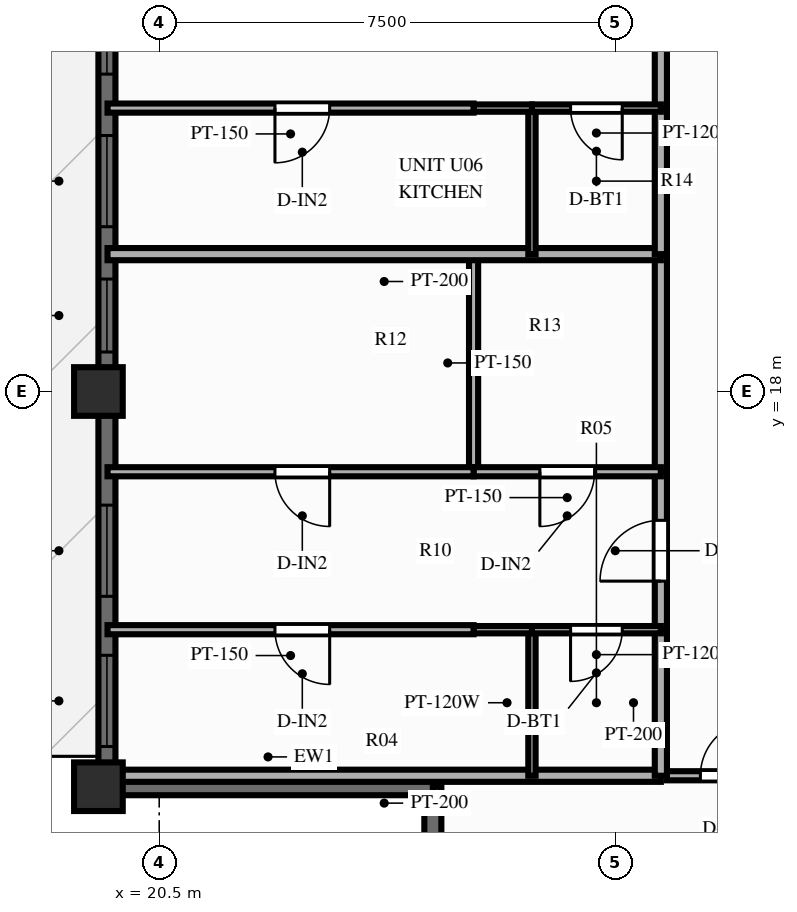
"""IFC4 building model, lengths in metres.
Left out: names, types, materials, properties, quantities, classifications, styles, units other than length and angle.
Written with IfcOpenShell. Run it as: python <this file> out.ifc"""

import sys

from ifc_helpers import new_model, si_unit, direction, frame, frame_2d, origin, origin_2d, place, context, subcontext, project, spatial, rectangle, extrude, source, transform, mapped, element, fill, save


model = new_model("IFC4")
c1 = context("Model", 3, precision=1e-05, world=origin(), true_north=direction((0.0, 1.0)))
c2 = subcontext(c1, "Body", "Model", "MODEL_VIEW")
j1 = project(units=[si_unit("LENGTHUNIT", "METRE"), si_unit("PLANEANGLEUNIT", "RADIAN")], contexts=[c1])
p1 = place(None, origin())
s1 = spatial("IfcSite", under=j1, at=p1, CompositionType="ELEMENT")
p2 = place(p1, origin())
s2 = spatial("IfcBuilding", under=s1, at=p2, CompositionType="ELEMENT")
p3 = place(p2, frame((0.0, 0.0, 202.6)))
s3 = spatial("IfcBuildingStorey", under=s2, at=p3, CompositionType="ELEMENT", Elevation=202.6)
m1 = source(origin(), c2, "Body", "SweptSolid", [
    extrude(rectangle(XDim=0.8, YDim=0.8, at=origin_2d()), origin(), (0.0, 0.0, 1.0), 3.9),
])
for number, where, z_axis, x_axis in (
    (1, (19.5, 18.0, 0.0), (0.0, 0.0, 1.0), (1.0, 0.0, 0.0)),
    (2, (19.5, 11.5, 0.0), (0.0, 0.0, 1.0), (1.0, 0.0, 0.0)),
):
    element("IfcColumn", number, at=place(p3, frame(where, z_axis=z_axis, x_axis=x_axis)), inside=s3, PredefinedType="COLUMN", context=c2, shape_type="MappedRepresentation", body=[
        mapped(m1, transform((0.0, 0.0, 0.0), scale=1.0)),
    ])
p4 = place(p3, frame((19.64, 11.5, 0.0), z_axis=(0.0, 0.0, 1.0), x_axis=(0.0, 1.0, 0.0)))
e3 = element("IfcWall", 3, at=p4, inside=s3, PredefinedType="SOLIDWALL", context=c2, shape_type="SweptSolid", body=[
    extrude(rectangle(XDim=31.0, YDim=0.28, at=frame_2d((15.5, 0.0))), origin(), (0.0, 0.0, 1.0), 2.79),
])
p5 = place(p4, frame((0.661, 0.0, 0.85)))
e4 = element("IfcOpeningElement", 4, at=p5, cuts=e3, PredefinedType="OPENING", context=c2, shape_type="SweptSolid", body=[
    extrude(rectangle(XDim=1.5, YDim=1.65, at=frame_2d((0.75, 0.825))), frame((0.0, 0.152, 0.0), z_axis=(0.0, -1.0, 0.0), x_axis=(1.0, 0.0, 0.0)), (0.0, 0.0, 1.0), 0.304),
])
p6 = place(p4, frame((3.131, 0.0, 0.85)))
e5 = element("IfcOpeningElement", 5, at=p6, cuts=e3, PredefinedType="OPENING", context=c2, shape_type="SweptSolid", body=[
    extrude(rectangle(XDim=1.5, YDim=1.65, at=frame_2d((0.75, 0.825))), frame((0.0, 0.152, 0.0), z_axis=(0.0, -1.0, 0.0), x_axis=(1.0, 0.0, 0.0)), (0.0, 0.0, 1.0), 0.304),
])
p7 = place(p4, frame((7.15, 0.0, 0.85)))
e6 = element("IfcOpeningElement", 6, at=p7, cuts=e3, PredefinedType="OPENING", context=c2, shape_type="SweptSolid", body=[
    extrude(rectangle(XDim=1.2, YDim=1.5, at=frame_2d((0.6, 0.75))), frame((0.0, 0.152, 0.0), z_axis=(0.0, -1.0, 0.0), x_axis=(1.0, 0.0, 0.0)), (0.0, 0.0, 1.0), 0.304),
])
p8 = place(p4, frame((9.21, 0.0, 0.85)))
e7 = element("IfcOpeningElement", 7, at=p8, cuts=e3, PredefinedType="OPENING", context=c2, shape_type="SweptSolid", body=[
    extrude(rectangle(XDim=1.5, YDim=1.65, at=frame_2d((0.75, 0.825))), frame((0.0, 0.152, 0.0), z_axis=(0.0, -1.0, 0.0), x_axis=(1.0, 0.0, 0.0)), (0.0, 0.0, 1.0), 0.304),
])
p9 = place(p4, frame((11.72, 0.0, 0.85)))
e8 = element("IfcOpeningElement", 8, at=p9, cuts=e3, PredefinedType="OPENING", context=c2, shape_type="SweptSolid", body=[
    extrude(rectangle(XDim=1.8, YDim=1.65, at=frame_2d((0.9, 0.825))), frame((0.0, 0.152, 0.0), z_axis=(0.0, -1.0, 0.0), x_axis=(1.0, 0.0, 0.0)), (0.0, 0.0, 1.0), 0.304),
])
p10 = place(p4, frame((14.808, 0.0, 0.85)))
e9 = element("IfcOpeningElement", 9, at=p10, cuts=e3, PredefinedType="OPENING", context=c2, shape_type="SweptSolid", body=[
    extrude(rectangle(XDim=1.8, YDim=1.65, at=frame_2d((0.9, 0.825))), frame((0.0, 0.152, 0.0), z_axis=(0.0, -1.0, 0.0), x_axis=(1.0, 0.0, 0.0)), (0.0, 0.0, 1.0), 0.304),
])
p11 = place(p4, frame((18.484, 0.0, 0.0)))
e10 = element("IfcOpeningElement", 10, at=p11, cuts=e3, PredefinedType="OPENING", context=c2, shape_type="SweptSolid", body=[
    extrude(rectangle(XDim=1.6, YDim=2.15, at=frame_2d((0.8, 1.075))), frame((0.0, 0.152, 0.0), z_axis=(0.0, -1.0, 0.0), x_axis=(1.0, 0.0, 0.0)), (0.0, 0.0, 1.0), 0.304),
])
p12 = place(p4, frame((21.754, 0.0, 0.85)))
e11 = element("IfcOpeningElement", 11, at=p12, cuts=e3, PredefinedType="OPENING", context=c2, shape_type="SweptSolid", body=[
    extrude(rectangle(XDim=1.8, YDim=1.65, at=frame_2d((0.9, 0.825))), frame((0.0, 0.152, 0.0), z_axis=(0.0, -1.0, 0.0), x_axis=(1.0, 0.0, 0.0)), (0.0, 0.0, 1.0), 0.304),
])
p13 = place(p4, frame((25.235, 0.0, 0.85)))
e12 = element("IfcOpeningElement", 12, at=p13, cuts=e3, PredefinedType="OPENING", context=c2, shape_type="SweptSolid", body=[
    extrude(rectangle(XDim=1.2, YDim=1.5, at=frame_2d((0.6, 0.75))), frame((0.0, 0.152, 0.0), z_axis=(0.0, -1.0, 0.0), x_axis=(1.0, 0.0, 0.0)), (0.0, 0.0, 1.0), 0.304),
])
p14 = place(p4, frame((27.945, 0.0, 0.85)))
e13 = element("IfcOpeningElement", 13, at=p14, cuts=e3, PredefinedType="OPENING", context=c2, shape_type="SweptSolid", body=[
    extrude(rectangle(XDim=1.8, YDim=1.65, at=frame_2d((0.9, 0.825))), frame((0.0, 0.152, 0.0), z_axis=(0.0, -1.0, 0.0), x_axis=(1.0, 0.0, 0.0)), (0.0, 0.0, 1.0), 0.304),
])
for number, where, z_axis, x_axis in (
    (14, (25.0, 6.08, 0.0), (0.0, 0.0, 1.0), (0.0, 1.0, 0.0)),
    (15, (19.58, 11.5, 0.0), (0.0, 0.0, 1.0), (1.0, 0.0, 0.0)),
):
    element("IfcWall", number, at=place(p3, frame(where, z_axis=z_axis, x_axis=x_axis)), inside=s3, PredefinedType="SOLIDWALL", context=c2, shape_type="SweptSolid", body=[
        extrude(rectangle(XDim=5.42, YDim=0.28, at=frame_2d((2.71, 0.0))), origin(), (0.0, 0.0, 1.0), 2.79),
    ])
p15 = place(p3, frame((28.85, 11.68, 0.0), z_axis=(0.0, 0.0, 1.0), x_axis=(1.0, 0.0, 0.0)))
e16 = element("IfcWall", 16, at=p15, inside=s3, PredefinedType="PARTITIONING", context=c2, shape_type="SweptSolid", body=[
    extrude(rectangle(XDim=2.33, YDim=0.15, at=frame_2d((1.165, 0.0))), origin(), (0.0, 0.0, 1.0), 3.6),
])
p16 = place(p15, frame((0.55, 0.0, 0.0)))
e17 = element("IfcOpeningElement", 17, at=p16, cuts=e16, PredefinedType="OPENING", context=c2, shape_type="SweptSolid", body=[
    extrude(rectangle(XDim=0.9, YDim=2.1, at=frame_2d((0.45, 1.05))), frame((0.0, 0.087, 0.0), z_axis=(0.0, -1.0, 0.0), x_axis=(1.0, 0.0, 0.0)), (0.0, 0.0, 1.0), 0.174),
])
p17 = place(p3, frame((28.75, 11.68, 0.0), z_axis=(0.0, 0.0, 1.0), x_axis=(-1.0, 0.0, 0.0)))
e18 = element("IfcWall", 18, at=p17, inside=s3, PredefinedType="PARTITIONING", context=c2, shape_type="SweptSolid", body=[
    extrude(rectangle(XDim=9.1, YDim=0.2, at=frame_2d((4.55, 0.0))), origin(), (0.0, 0.0, 1.0), 3.6),
])
p18 = place(p3, frame((28.75, 11.68, 0.0), z_axis=(0.0, 0.0, 1.0), x_axis=(0.0, 1.0, 0.0)))
e19 = element("IfcWall", 19, at=p18, inside=s3, PredefinedType="PARTITIONING", context=c2, shape_type="SweptSolid", body=[
    extrude(rectangle(XDim=2.402, YDim=0.2, at=frame_2d((1.201, 0.0))), origin(), (0.0, 0.0, 1.0), 3.6),
])
p19 = place(p3, frame((28.75, 14.082, 0.0), z_axis=(0.0, 0.0, 1.0), x_axis=(0.0, 1.0, 0.0)))
e20 = element("IfcWall", 20, at=p19, inside=s3, PredefinedType="PARTITIONING", context=c2, shape_type="SweptSolid", body=[
    extrude(rectangle(XDim=2.598, YDim=0.2, at=frame_2d((1.299, 0.0))), origin(), (0.0, 0.0, 1.0), 3.6),
])
p20 = place(p19, frame((0.799, 0.0, 0.0)))
e21 = element("IfcOpeningElement", 21, at=p20, cuts=e20, PredefinedType="OPENING", context=c2, shape_type="SweptSolid", body=[
    extrude(rectangle(XDim=1.0, YDim=2.15, at=frame_2d((0.5, 1.075))), frame((0.0, 0.112, 0.0), z_axis=(0.0, -1.0, 0.0), x_axis=(1.0, 0.0, 0.0)), (0.0, 0.0, 1.0), 0.224),
])
p21 = place(p3, frame((28.75, 16.68, 0.0), z_axis=(0.0, 0.0, 1.0), x_axis=(0.0, 1.0, 0.0)))
e22 = element("IfcWall", 22, at=p21, inside=s3, PredefinedType="PARTITIONING", context=c2, shape_type="SweptSolid", body=[
    extrude(rectangle(XDim=3.579, YDim=0.2, at=frame_2d((1.79, 0.0))), origin(), (0.0, 0.0, 1.0), 3.6),
])
p22 = place(p3, frame((26.63, 11.68, 0.0), z_axis=(0.0, 0.0, 1.0), x_axis=(0.0, 1.0, 0.0)))
e23 = element("IfcWall", 23, at=p22, inside=s3, PredefinedType="PARTITIONING", context=c2, shape_type="SweptSolid", body=[
    extrude(rectangle(XDim=2.402, YDim=0.12, at=frame_2d((1.201, 0.0))), origin(), (0.0, 0.0, 1.0), 3.6),
])
p23 = place(p3, frame((25.67, 16.68, 0.0), z_axis=(0.0, 0.0, 1.0), x_axis=(0.0, 1.0, 0.0)))
e24 = element("IfcWall", 24, at=p23, inside=s3, PredefinedType="PARTITIONING", context=c2, shape_type="SweptSolid", body=[
    extrude(rectangle(XDim=3.579, YDim=0.15, at=frame_2d((1.79, 0.0))), origin(), (0.0, 0.0, 1.0), 3.39),
])
p24 = place(p3, frame((28.75, 14.082, 0.0), z_axis=(0.0, 0.0, 1.0), x_axis=(-1.0, 0.0, 0.0)))
e25 = element("IfcWall", 25, at=p24, inside=s3, PredefinedType="PARTITIONING", context=c2, shape_type="SweptSolid", body=[
    extrude(rectangle(XDim=2.12, YDim=0.12, at=frame_2d((1.06, 0.0))), origin(), (0.0, 0.0, 1.0), 3.6),
])
p25 = place(p24, frame((0.635, 0.0, 0.0)))
e26 = element("IfcOpeningElement", 26, at=p25, cuts=e25, PredefinedType="OPENING", context=c2, shape_type="SweptSolid", body=[
    extrude(rectangle(XDim=0.85, YDim=2.05, at=frame_2d((0.425, 1.025))), frame((0.0, 0.072, 0.0), z_axis=(0.0, -1.0, 0.0), x_axis=(1.0, 0.0, 0.0)), (0.0, 0.0, 1.0), 0.144),
])
p26 = place(p3, frame((26.63, 14.082, 0.0), z_axis=(0.0, 0.0, 1.0), x_axis=(-1.0, 0.0, 0.0)))
e27 = element("IfcWall", 27, at=p26, inside=s3, PredefinedType="PARTITIONING", context=c2, shape_type="SweptSolid", body=[
    extrude(rectangle(XDim=0.96, YDim=0.12, at=frame_2d((0.48, 0.0))), origin(), (0.0, 0.0, 1.0), 3.6),
])
p27 = place(p3, frame((25.67, 14.082, 0.0), z_axis=(0.0, 0.0, 1.0), x_axis=(-1.0, 0.0, 0.0)))
e28 = element("IfcWall", 28, at=p27, inside=s3, PredefinedType="PARTITIONING", context=c2, shape_type="SweptSolid", body=[
    extrude(rectangle(XDim=6.02, YDim=0.15, at=frame_2d((3.01, 0.0))), origin(), (0.0, 0.0, 1.0), 3.6),
])
p28 = place(p27, frame((2.367, 0.0, 0.0)))
e29 = element("IfcOpeningElement", 29, at=p28, cuts=e28, PredefinedType="OPENING", context=c2, shape_type="SweptSolid", body=[
    extrude(rectangle(XDim=0.9, YDim=2.1, at=frame_2d((0.45, 1.05))), frame((0.0, 0.087, 0.0), z_axis=(0.0, -1.0, 0.0), x_axis=(1.0, 0.0, 0.0)), (0.0, 0.0, 1.0), 0.174),
])
p29 = place(p3, frame((28.75, 16.68, 0.0), z_axis=(0.0, 0.0, 1.0), x_axis=(-1.0, 0.0, 0.0)))
e30 = element("IfcWall", 30, at=p29, inside=s3, PredefinedType="PARTITIONING", context=c2, shape_type="SweptSolid", body=[
    extrude(rectangle(XDim=3.08, YDim=0.15, at=frame_2d((1.54, 0.0))), origin(), (0.0, 0.0, 1.0), 3.6),
])
p30 = place(p29, frame((1.09, 0.0, 0.0)))
e31 = element("IfcOpeningElement", 31, at=p30, cuts=e30, PredefinedType="OPENING", context=c2, shape_type="SweptSolid", body=[
    extrude(rectangle(XDim=0.9, YDim=2.1, at=frame_2d((0.45, 1.05))), frame((0.0, 0.087, 0.0), z_axis=(0.0, -1.0, 0.0), x_axis=(1.0, 0.0, 0.0)), (0.0, 0.0, 1.0), 0.174),
])
p31 = place(p3, frame((25.67, 16.68, 0.0), z_axis=(0.0, 0.0, 1.0), x_axis=(-1.0, 0.0, 0.0)))
e32 = element("IfcWall", 32, at=p31, inside=s3, PredefinedType="PARTITIONING", context=c2, shape_type="SweptSolid", body=[
    extrude(rectangle(XDim=6.02, YDim=0.15, at=frame_2d((3.01, 0.0))), origin(), (0.0, 0.0, 1.0), 3.6),
])
p32 = place(p31, frame((2.367, 0.0, 0.0)))
e33 = element("IfcOpeningElement", 33, at=p32, cuts=e32, PredefinedType="OPENING", context=c2, shape_type="SweptSolid", body=[
    extrude(rectangle(XDim=0.9, YDim=2.1, at=frame_2d((0.45, 1.05))), frame((0.0, 0.087, 0.0), z_axis=(0.0, -1.0, 0.0), x_axis=(1.0, 0.0, 0.0)), (0.0, 0.0, 1.0), 0.174),
])
p33 = place(p3, frame((28.75, 20.259, 0.0), z_axis=(0.0, 0.0, 1.0), x_axis=(-1.0, 0.0, 0.0)))
e34 = element("IfcWall", 34, at=p33, inside=s3, PredefinedType="PARTITIONING", context=c2, shape_type="SweptSolid", body=[
    extrude(rectangle(XDim=9.1, YDim=0.2, at=frame_2d((4.55, 0.0))), origin(), (0.0, 0.0, 1.0), 3.6),
])
p34 = place(p3, frame((28.75, 20.259, 0.0), z_axis=(0.0, 0.0, 1.0), x_axis=(0.0, 1.0, 0.0)))
e35 = element("IfcWall", 35, at=p34, inside=s3, PredefinedType="PARTITIONING", context=c2, shape_type="SweptSolid", body=[
    extrude(rectangle(XDim=2.402, YDim=0.2, at=frame_2d((1.201, 0.0))), origin(), (0.0, 0.0, 1.0), 3.6),
])
p35 = place(p3, frame((28.75, 22.661, 0.0), z_axis=(0.0, 0.0, 1.0), x_axis=(0.0, 1.0, 0.0)))
e36 = element("IfcWall", 36, at=p35, inside=s3, PredefinedType="PARTITIONING", context=c2, shape_type="SweptSolid", body=[
    extrude(rectangle(XDim=2.917, YDim=0.2, at=frame_2d((1.458, 0.0))), origin(), (0.0, 0.0, 1.0), 3.6),
])
p36 = place(p35, frame((0.958, 0.0, 0.0)))
e37 = element("IfcOpeningElement", 37, at=p36, cuts=e36, PredefinedType="OPENING", context=c2, shape_type="SweptSolid", body=[
    extrude(rectangle(XDim=1.0, YDim=2.15, at=frame_2d((0.5, 1.075))), frame((0.0, 0.112, 0.0), z_axis=(0.0, -1.0, 0.0), x_axis=(1.0, 0.0, 0.0)), (0.0, 0.0, 1.0), 0.224),
])
p37 = place(p3, frame((26.63, 20.259, 0.0), z_axis=(0.0, 0.0, 1.0), x_axis=(0.0, 1.0, 0.0)))
e38 = element("IfcWall", 38, at=p37, inside=s3, PredefinedType="PARTITIONING", context=c2, shape_type="SweptSolid", body=[
    extrude(rectangle(XDim=2.402, YDim=0.12, at=frame_2d((1.201, 0.0))), origin(), (0.0, 0.0, 1.0), 3.6),
])
p38 = place(p3, frame((28.75, 22.661, 0.0), z_axis=(0.0, 0.0, 1.0), x_axis=(-1.0, 0.0, 0.0)))
e39 = element("IfcWall", 39, at=p38, inside=s3, PredefinedType="PARTITIONING", context=c2, shape_type="SweptSolid", body=[
    extrude(rectangle(XDim=2.12, YDim=0.12, at=frame_2d((1.06, 0.0))), origin(), (0.0, 0.0, 1.0), 3.6),
])
p39 = place(p38, frame((0.635, 0.0, 0.0)))
e40 = element("IfcOpeningElement", 40, at=p39, cuts=e39, PredefinedType="OPENING", context=c2, shape_type="SweptSolid", body=[
    extrude(rectangle(XDim=0.85, YDim=2.05, at=frame_2d((0.425, 1.025))), frame((0.0, 0.072, 0.0), z_axis=(0.0, -1.0, 0.0), x_axis=(1.0, 0.0, 0.0)), (0.0, 0.0, 1.0), 0.144),
])
p40 = place(p3, frame((26.63, 22.661, 0.0), z_axis=(0.0, 0.0, 1.0), x_axis=(-1.0, 0.0, 0.0)))
e41 = element("IfcWall", 41, at=p40, inside=s3, PredefinedType="PARTITIONING", context=c2, shape_type="SweptSolid", body=[
    extrude(rectangle(XDim=0.96, YDim=0.12, at=frame_2d((0.48, 0.0))), origin(), (0.0, 0.0, 1.0), 3.6),
])
p41 = place(p3, frame((25.67, 22.661, 0.0), z_axis=(0.0, 0.0, 1.0), x_axis=(-1.0, 0.0, 0.0)))
e42 = element("IfcWall", 42, at=p41, inside=s3, PredefinedType="PARTITIONING", context=c2, shape_type="SweptSolid", body=[
    extrude(rectangle(XDim=6.02, YDim=0.15, at=frame_2d((3.01, 0.0))), origin(), (0.0, 0.0, 1.0), 3.6),
])
p42 = place(p41, frame((2.367, 0.0, 0.0)))
e43 = element("IfcOpeningElement", 43, at=p42, cuts=e42, PredefinedType="OPENING", context=c2, shape_type="SweptSolid", body=[
    extrude(rectangle(XDim=0.9, YDim=2.1, at=frame_2d((0.45, 1.05))), frame((0.0, 0.087, 0.0), z_axis=(0.0, -1.0, 0.0), x_axis=(1.0, 0.0, 0.0)), (0.0, 0.0, 1.0), 0.174),
])
m2 = source(origin(), c2, "Body", "SweptSolid", [
    extrude(rectangle(XDim=1.5, YDim=1.65, at=frame_2d((0.75, 0.825))), frame((0.0, 0.03, 0.0), z_axis=(0.0, -1.0, 0.0), x_axis=(1.0, 0.0, 0.0)), (0.0, 0.0, 1.0), 0.06),
])
p43 = place(p5, origin())
e44 = element("IfcWindow", 44, at=p43, inside=s3, PartitioningType="SINGLE_PANEL", PredefinedType="WINDOW", context=c2, shape_type="MappedRepresentation", body=[
    mapped(m2, transform((0.0, 0.0, 0.0), scale=1.0)),
])
fill(e4, e44)
p44 = place(p6, origin())
e45 = element("IfcWindow", 45, at=p44, inside=s3, PartitioningType="SINGLE_PANEL", PredefinedType="WINDOW", context=c2, shape_type="MappedRepresentation", body=[
    mapped(m2, transform((0.0, 0.0, 0.0), scale=1.0)),
])
fill(e5, e45)
m3 = source(origin(), c2, "Body", "SweptSolid", [
    extrude(rectangle(XDim=1.2, YDim=1.5, at=frame_2d((0.6, 0.75))), frame((0.0, 0.03, 0.0), z_axis=(0.0, -1.0, 0.0), x_axis=(1.0, 0.0, 0.0)), (0.0, 0.0, 1.0), 0.06),
])
p45 = place(p7, origin())
e46 = element("IfcWindow", 46, at=p45, inside=s3, PartitioningType="SINGLE_PANEL", PredefinedType="WINDOW", context=c2, shape_type="MappedRepresentation", body=[
    mapped(m3, transform((0.0, 0.0, 0.0), scale=1.0)),
])
fill(e6, e46)
p46 = place(p8, origin())
e47 = element("IfcWindow", 47, at=p46, inside=s3, PartitioningType="SINGLE_PANEL", PredefinedType="WINDOW", context=c2, shape_type="MappedRepresentation", body=[
    mapped(m2, transform((0.0, 0.0, 0.0), scale=1.0)),
])
fill(e7, e47)
m4 = source(origin(), c2, "Body", "SweptSolid", [
    extrude(rectangle(XDim=1.8, YDim=1.65, at=frame_2d((0.9, 0.825))), frame((0.0, 0.03, 0.0), z_axis=(0.0, -1.0, 0.0), x_axis=(1.0, 0.0, 0.0)), (0.0, 0.0, 1.0), 0.06),
])
p47 = place(p9, origin())
e48 = element("IfcWindow", 48, at=p47, inside=s3, PartitioningType="SINGLE_PANEL", PredefinedType="WINDOW", context=c2, shape_type="MappedRepresentation", body=[
    mapped(m4, transform((0.0, 0.0, 0.0), scale=1.0)),
])
fill(e8, e48)
m5 = source(origin(), c2, "Body", "SweptSolid", [
    extrude(rectangle(XDim=0.9, YDim=2.1, at=frame_2d((0.45, 1.05))), frame((0.0, 0.025, 0.0), z_axis=(0.0, -1.0, 0.0), x_axis=(1.0, 0.0, 0.0)), (0.0, 0.0, 1.0), 0.05),
])
p48 = place(p16, origin())
e49 = element("IfcDoor", 49, at=p48, inside=s3, OperationType="SINGLE_SWING_RIGHT", PredefinedType="DOOR", context=c2, shape_type="MappedRepresentation", body=[
    mapped(m5, transform((0.0, 0.0, 0.0), scale=1.0)),
])
fill(e17, e49)
m6 = source(origin(), c2, "Body", "SweptSolid", [
    extrude(rectangle(XDim=1.0, YDim=2.15, at=frame_2d((0.5, 1.075))), frame((0.0, 0.025, 0.0), z_axis=(0.0, -1.0, 0.0), x_axis=(1.0, 0.0, 0.0)), (0.0, 0.0, 1.0), 0.05),
])
p49 = place(p20, origin())
e50 = element("IfcDoor", 50, at=p49, inside=s3, OperationType="SINGLE_SWING_LEFT", PredefinedType="DOOR", context=c2, shape_type="MappedRepresentation", body=[
    mapped(m6, transform((0.0, 0.0, 0.0), scale=1.0)),
])
fill(e21, e50)
m7 = source(origin(), c2, "Body", "SweptSolid", [
    extrude(rectangle(XDim=0.85, YDim=2.05, at=frame_2d((0.425, 1.025))), frame((0.0, 0.025, 0.0), z_axis=(0.0, -1.0, 0.0), x_axis=(1.0, 0.0, 0.0)), (0.0, 0.0, 1.0), 0.05),
])
p50 = place(p25, origin())
e51 = element("IfcDoor", 51, at=p50, inside=s3, OperationType="SINGLE_SWING_RIGHT", PredefinedType="DOOR", context=c2, shape_type="MappedRepresentation", body=[
    mapped(m7, transform((0.0, 0.0, 0.0), scale=1.0)),
])
fill(e26, e51)
p51 = place(p28, origin())
e52 = element("IfcDoor", 52, at=p51, inside=s3, OperationType="SINGLE_SWING_LEFT", PredefinedType="DOOR", context=c2, shape_type="MappedRepresentation", body=[
    mapped(m5, transform((0.0, 0.0, 0.0), scale=1.0)),
])
fill(e29, e52)
p52 = place(p30, origin())
e53 = element("IfcDoor", 53, at=p52, inside=s3, OperationType="SINGLE_SWING_RIGHT", PredefinedType="DOOR", context=c2, shape_type="MappedRepresentation", body=[
    mapped(m5, transform((0.0, 0.0, 0.0), scale=1.0)),
])
fill(e31, e53)
p53 = place(p32, origin())
e54 = element("IfcDoor", 54, at=p53, inside=s3, OperationType="SINGLE_SWING_LEFT", PredefinedType="DOOR", context=c2, shape_type="MappedRepresentation", body=[
    mapped(m5, transform((0.0, 0.0, 0.0), scale=1.0)),
])
fill(e33, e54)
p54 = place(p39, origin())
e55 = element("IfcDoor", 55, at=p54, inside=s3, OperationType="SINGLE_SWING_LEFT", PredefinedType="DOOR", context=c2, shape_type="MappedRepresentation", body=[
    mapped(m7, transform((0.0, 0.0, 0.0), scale=1.0)),
])
fill(e40, e55)
p55 = place(p42, origin())
e56 = element("IfcDoor", 56, at=p55, inside=s3, OperationType="SINGLE_SWING_RIGHT", PredefinedType="DOOR", context=c2, shape_type="MappedRepresentation", body=[
    mapped(m5, transform((0.0, 0.0, 0.0), scale=1.0)),
])
fill(e43, e56)
save(model, sys.argv[1])
